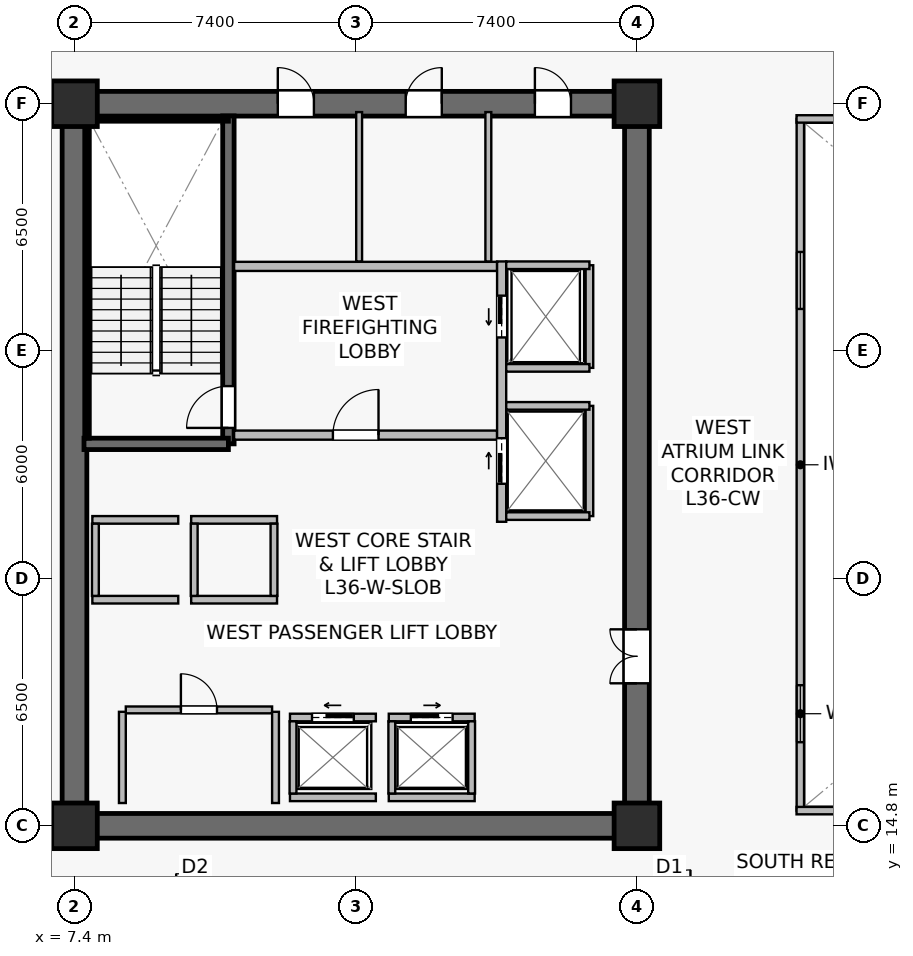
"""IFC4 building model, lengths in metres.
Left out: names, types, materials, properties, quantities, classifications, styles, units other than length and angle.
Written with IfcOpenShell. Run it as: python <this file> out.ifc"""

import sys

from ifc_helpers import new_model, si_unit, direction, frame, frame_2d, origin, origin_2d, place, context, subcontext, project, spatial, rectangle, extrude, source, transform, mapped, element, fill, save


model = new_model("IFC4")
c1 = context("Model", 3, precision=1e-05, world=origin(), true_north=direction((0.0, 1.0)))
c2 = subcontext(c1, "Body", "Model", "MODEL_VIEW")
j1 = project(units=[si_unit("LENGTHUNIT", "METRE"), si_unit("PLANEANGLEUNIT", "RADIAN")], contexts=[c1])
p1 = place(None, origin())
s1 = spatial("IfcSite", under=j1, at=p1, CompositionType="ELEMENT")
p2 = place(p1, origin())
s2 = spatial("IfcBuilding", under=s1, at=p2, CompositionType="ELEMENT")
p3 = place(p2, frame((0.0, 0.0, 150.2)))
s3 = spatial("IfcBuildingStorey", under=s2, at=p3, CompositionType="ELEMENT", Elevation=150.2)
p4 = place(p3, frame((7.075, 14.8, 0.0), z_axis=(0.0, 0.0, 1.0), x_axis=(1.0, 0.0, 0.0)))
e1 = element("IfcWall", 1, at=p4, inside=s3, PredefinedType="SHEAR", context=c2, shape_type="SweptSolid", body=[
    extrude(rectangle(XDim=15.45, YDim=0.65, at=frame_2d((7.725, 0.0))), origin(), (0.0, 0.0, 1.0), 3.79),
])
p5 = place(p3, frame((7.075, 33.8, 0.0), z_axis=(0.0, 0.0, 1.0), x_axis=(1.0, 0.0, 0.0)))
e2 = element("IfcWall", 2, at=p5, inside=s3, PredefinedType="SHEAR", context=c2, shape_type="SweptSolid", body=[
    extrude(rectangle(XDim=15.45, YDim=0.65, at=frame_2d((7.725, 0.0))), origin(), (0.0, 0.0, 1.0), 3.79),
])
p6 = place(p5, frame((5.675, 0.0, 0.0)))
e3 = element("IfcOpeningElement", 3, at=p6, cuts=e2, PredefinedType="OPENING", context=c2, shape_type="SweptSolid", body=[
    extrude(rectangle(XDim=0.95, YDim=2.15, at=frame_2d((0.475, 1.075))), frame((0.0, 0.335, 0.0), z_axis=(0.0, -1.0, 0.0), x_axis=(1.0, 0.0, 0.0)), (0.0, 0.0, 1.0), 0.67),
])
p7 = place(p5, frame((9.04, 0.0, 0.0)))
e4 = element("IfcOpeningElement", 4, at=p7, cuts=e2, PredefinedType="OPENING", context=c2, shape_type="SweptSolid", body=[
    extrude(rectangle(XDim=0.95, YDim=2.15, at=frame_2d((0.475, 1.075))), frame((0.0, 0.335, 0.0), z_axis=(0.0, -1.0, 0.0), x_axis=(1.0, 0.0, 0.0)), (0.0, 0.0, 1.0), 0.67),
])
p8 = place(p5, frame((12.44, 0.0, 0.0)))
e5 = element("IfcOpeningElement", 5, at=p8, cuts=e2, PredefinedType="OPENING", context=c2, shape_type="SweptSolid", body=[
    extrude(rectangle(XDim=0.95, YDim=2.15, at=frame_2d((0.475, 1.075))), frame((0.0, 0.335, 0.0), z_axis=(0.0, -1.0, 0.0), x_axis=(1.0, 0.0, 0.0)), (0.0, 0.0, 1.0), 0.67),
])
p9 = place(p3, frame((7.4, 15.125, 0.0), z_axis=(0.0, 0.0, 1.0), x_axis=(0.0, 1.0, 0.0)))
e6 = element("IfcWall", 6, at=p9, inside=s3, PredefinedType="SHEAR", context=c2, shape_type="SweptSolid", body=[
    extrude(rectangle(XDim=18.35, YDim=0.65, at=frame_2d((9.175, 0.0))), origin(), (0.0, 0.0, 1.0), 3.79),
])
p10 = place(p3, frame((22.2, 15.125, 0.0), z_axis=(0.0, 0.0, 1.0), x_axis=(0.0, 1.0, 0.0)))
e7 = element("IfcWall", 7, at=p10, inside=s3, PredefinedType="SHEAR", context=c2, shape_type="SweptSolid", body=[
    extrude(rectangle(XDim=18.35, YDim=0.65, at=frame_2d((9.175, 0.0))), origin(), (0.0, 0.0, 1.0), 3.79),
])
p11 = place(p10, frame((3.425, 0.0, 0.0)))
e8 = element("IfcOpeningElement", 8, at=p11, cuts=e7, PredefinedType="OPENING", context=c2, shape_type="SweptSolid", body=[
    extrude(rectangle(XDim=1.42, YDim=2.2, at=frame_2d((0.71, 1.1))), frame((0.0, 0.335, 0.0), z_axis=(0.0, -1.0, 0.0), x_axis=(1.0, 0.0, 0.0)), (0.0, 0.0, 1.0), 0.67),
])
p12 = place(p3, frame((11.45, 24.85, 0.0), z_axis=(0.0, 0.0, 1.0), x_axis=(0.0, 1.0, 0.0)))
e9 = element("IfcWall", 9, at=p12, inside=s3, PredefinedType="SHEAR", context=c2, shape_type="SweptSolid", body=[
    extrude(rectangle(XDim=8.63, YDim=0.3, at=frame_2d((4.315, 0.0))), origin(), (0.0, 0.0, 1.0), 3.79),
])
p13 = place(p12, frame((0.42, 0.0, 0.0)))
e10 = element("IfcOpeningElement", 10, at=p13, cuts=e9, PredefinedType="OPENING", context=c2, shape_type="SweptSolid", body=[
    extrude(rectangle(XDim=1.1, YDim=2.15, at=frame_2d((0.55, 1.075))), frame((0.0, 0.16, 0.0), z_axis=(0.0, -1.0, 0.0), x_axis=(1.0, 0.0, 0.0)), (0.0, 0.0, 1.0), 0.32),
])
p14 = place(p3, frame((7.65, 24.85, 0.0), z_axis=(0.0, 0.0, 1.0), x_axis=(1.0, 0.0, 0.0)))
e11 = element("IfcWall", 11, at=p14, inside=s3, PredefinedType="SHEAR", context=c2, shape_type="SweptSolid", body=[
    extrude(rectangle(XDim=3.8, YDim=0.3, at=frame_2d((1.9, 0.0))), origin(), (0.0, 0.0, 1.0), 3.79),
])
p15 = place(p3, frame((7.73, 33.4, 0.0), z_axis=(0.0, 0.0, 1.0), x_axis=(1.0, 0.0, 0.0)))
e12 = element("IfcWall", 12, at=p15, inside=s3, PredefinedType="SOLIDWALL", context=c2, shape_type="SweptSolid", body=[
    extrude(rectangle(XDim=3.72, YDim=0.12, at=frame_2d((1.86, 0.0))), origin(), (0.0, 0.0, 1.0), 3.79),
])
p16 = place(p3, frame((7.73, 25.0, 0.0), z_axis=(0.0, 0.0, 1.0), x_axis=(0.0, 1.0, 0.0)))
e13 = element("IfcWall", 13, at=p16, inside=s3, PredefinedType="SOLIDWALL", context=c2, shape_type="SweptSolid", body=[
    extrude(rectangle(XDim=8.32, YDim=0.12, at=frame_2d((4.16, 0.0))), origin(), (0.0, 0.0, 1.0), 3.79),
])
m1 = source(origin(), c2, "Body", "SweptSolid", [
    extrude(rectangle(XDim=1.2, YDim=1.2, at=origin_2d()), origin(), (0.0, 0.0, 1.0), 4.1),
])
for number, where, z_axis, x_axis in (
    (14, (7.4, 14.8, 0.0), (0.0, 0.0, 1.0), (1.0, 0.0, 0.0)),
    (15, (22.2, 14.8, 0.0), (0.0, 0.0, 1.0), (1.0, 0.0, 0.0)),
    (16, (7.4, 33.8, 0.0), (0.0, 0.0, 1.0), (1.0, 0.0, 0.0)),
    (17, (22.2, 33.8, 0.0), (0.0, 0.0, 1.0), (1.0, 0.0, 0.0)),
):
    element("IfcColumn", number, at=place(p3, frame(where, z_axis=z_axis, x_axis=x_axis)), inside=s3, PredefinedType="COLUMN", context=c2, shape_type="MappedRepresentation", body=[
        mapped(m1, transform((0.0, 0.0, 0.0), scale=1.0)),
    ])
p17 = place(p3, frame((11.6, 25.08, 0.0), z_axis=(0.0, 0.0, 1.0), x_axis=(1.0, 0.0, 0.0)))
e18 = element("IfcWall", 18, at=p17, inside=s3, PredefinedType="SOLIDWALL", context=c2, shape_type="SweptSolid", body=[
    extrude(rectangle(XDim=6.92, YDim=0.24, at=frame_2d((3.46, 0.0))), origin(), (0.0, 0.0, 1.0), 3.187),
])
p18 = place(p17, frame((2.6, 0.0, 0.0)))
e19 = element("IfcOpeningElement", 19, at=p18, cuts=e18, PredefinedType="OPENING", context=c2, shape_type="SweptSolid", body=[
    extrude(rectangle(XDim=1.2, YDim=2.16, at=frame_2d((0.6, 1.08))), frame((0.0, 0.13, 0.0), z_axis=(0.0, -1.0, 0.0), x_axis=(1.0, 0.0, 0.0)), (0.0, 0.0, 1.0), 0.26),
])
p19 = place(p3, frame((11.6, 29.52, 0.0), z_axis=(0.0, 0.0, 1.0), x_axis=(1.0, 0.0, 0.0)))
e20 = element("IfcWall", 20, at=p19, inside=s3, PredefinedType="SOLIDWALL", context=c2, shape_type="SweptSolid", body=[
    extrude(rectangle(XDim=6.92, YDim=0.24, at=frame_2d((3.46, 0.0))), origin(), (0.0, 0.0, 1.0), 3.187),
])
p20 = place(p3, frame((18.64, 22.8, 0.0), z_axis=(0.0, 0.0, 1.0), x_axis=(0.0, 1.0, 0.0)))
e21 = element("IfcWall", 21, at=p20, inside=s3, PredefinedType="SOLIDWALL", context=c2, shape_type="SweptSolid", body=[
    extrude(rectangle(XDim=6.85, YDim=0.24, at=frame_2d((3.425, 0.0))), origin(), (0.0, 0.0, 1.0), 2.875),
])
p21 = place(p20, frame((4.85, 0.0, 0.0)))
e22 = element("IfcOpeningElement", 22, at=p21, cuts=e21, PredefinedType="OPENING", context=c2, shape_type="SweptSolid", body=[
    extrude(rectangle(XDim=1.1, YDim=2.22, at=frame_2d((0.55, 1.11))), frame((0.0, 0.13, 0.0), z_axis=(0.0, -1.0, 0.0), x_axis=(1.0, 0.0, 0.0)), (0.0, 0.0, 1.0), 0.26),
])
p22 = place(p20, frame((1.0, 0.0, 0.0)))
e23 = element("IfcOpeningElement", 23, at=p22, cuts=e21, PredefinedType="OPENING", context=c2, shape_type="SweptSolid", body=[
    extrude(rectangle(XDim=1.2, YDim=2.22, at=frame_2d((0.6, 1.11))), frame((0.0, 0.13, 0.0), z_axis=(0.0, -1.0, 0.0), x_axis=(1.0, 0.0, 0.0)), (0.0, 0.0, 1.0), 0.26),
])
p23 = place(p3, frame((13.07, 17.65, 0.0), z_axis=(0.0, 0.0, 1.0), x_axis=(1.0, 0.0, 0.0)))
e24 = element("IfcWall", 24, at=p23, inside=s3, PredefinedType="SOLIDWALL", context=c2, shape_type="SweptSolid", body=[
    extrude(rectangle(XDim=2.26, YDim=0.2, at=frame_2d((1.13, 0.0))), origin(), (0.0, 0.0, 1.0), 3.187),
])
p24 = place(p23, frame((0.58, 0.0, 0.0)))
e25 = element("IfcOpeningElement", 25, at=p24, cuts=e24, PredefinedType="OPENING", context=c2, shape_type="SweptSolid", body=[
    extrude(rectangle(XDim=1.1, YDim=2.22, at=frame_2d((0.55, 1.11))), frame((0.0, 0.11, 0.0), z_axis=(0.0, -1.0, 0.0), x_axis=(1.0, 0.0, 0.0)), (0.0, 0.0, 1.0), 0.22),
])
p25 = place(p3, frame((13.07, 15.55, 0.0), z_axis=(0.0, 0.0, 1.0), x_axis=(1.0, 0.0, 0.0)))
e26 = element("IfcWall", 26, at=p25, inside=s3, PredefinedType="SOLIDWALL", context=c2, shape_type="SweptSolid", body=[
    extrude(rectangle(XDim=2.26, YDim=0.2, at=frame_2d((1.13, 0.0))), origin(), (0.0, 0.0, 1.0), 3.187),
])
p26 = place(p3, frame((13.15, 15.65, 0.0), z_axis=(0.0, 0.0, 1.0), x_axis=(0.0, 1.0, 0.0)))
e27 = element("IfcWall", 27, at=p26, inside=s3, PredefinedType="SOLIDWALL", context=c2, shape_type="SweptSolid", body=[
    extrude(rectangle(XDim=1.9, YDim=0.18, at=frame_2d((0.95, 0.0))), origin(), (0.0, 0.0, 1.0), 3.79),
])
p27 = place(p3, frame((15.67, 17.65, 0.0), z_axis=(0.0, 0.0, 1.0), x_axis=(1.0, 0.0, 0.0)))
e28 = element("IfcWall", 28, at=p27, inside=s3, PredefinedType="SOLIDWALL", context=c2, shape_type="SweptSolid", body=[
    extrude(rectangle(XDim=2.26, YDim=0.2, at=frame_2d((1.13, 0.0))), origin(), (0.0, 0.0, 1.0), 3.79),
])
p28 = place(p27, frame((0.58, 0.0, 0.0)))
e29 = element("IfcOpeningElement", 29, at=p28, cuts=e28, PredefinedType="OPENING", context=c2, shape_type="SweptSolid", body=[
    extrude(rectangle(XDim=1.1, YDim=2.22, at=frame_2d((0.55, 1.11))), frame((0.0, 0.11, 0.0), z_axis=(0.0, -1.0, 0.0), x_axis=(1.0, 0.0, 0.0)), (0.0, 0.0, 1.0), 0.22),
])
p29 = place(p3, frame((15.67, 15.55, 0.0), z_axis=(0.0, 0.0, 1.0), x_axis=(1.0, 0.0, 0.0)))
e30 = element("IfcWall", 30, at=p29, inside=s3, PredefinedType="SOLIDWALL", context=c2, shape_type="SweptSolid", body=[
    extrude(rectangle(XDim=2.26, YDim=0.2, at=frame_2d((1.13, 0.0))), origin(), (0.0, 0.0, 1.0), 3.79),
])
for number, where, z_axis, x_axis in (
    (31, (15.75, 15.65, 0.0), (0.0, 0.0, 1.0), (0.0, 1.0, 0.0)),
    (32, (17.85, 15.65, 0.0), (0.0, 0.0, 1.0), (0.0, 1.0, 0.0)),
):
    element("IfcWall", number, at=place(p3, frame(where, z_axis=z_axis, x_axis=x_axis)), inside=s3, PredefinedType="SOLIDWALL", context=c2, shape_type="SweptSolid", body=[
        extrude(rectangle(XDim=1.9, YDim=0.18, at=frame_2d((0.95, 0.0))), origin(), (0.0, 0.0, 1.0), 3.79),
    ])
for number, where, z_axis, x_axis in (
    (33, (7.87, 20.75, 0.0), (0.0, 0.0, 1.0), (1.0, 0.0, 0.0)),
    (34, (7.87, 22.85, 0.0), (0.0, 0.0, 1.0), (1.0, 0.0, 0.0)),
):
    element("IfcWall", number, at=place(p3, frame(where, z_axis=z_axis, x_axis=x_axis)), inside=s3, PredefinedType="SOLIDWALL", context=c2, shape_type="SweptSolid", body=[
        extrude(rectangle(XDim=2.26, YDim=0.2, at=frame_2d((1.13, 0.0))), origin(), (0.0, 0.0, 1.0), 3.79),
    ])
p30 = place(p3, frame((7.95, 20.85, 0.0), z_axis=(0.0, 0.0, 1.0), x_axis=(0.0, 1.0, 0.0)))
e35 = element("IfcWall", 35, at=p30, inside=s3, PredefinedType="SOLIDWALL", context=c2, shape_type="SweptSolid", body=[
    extrude(rectangle(XDim=1.9, YDim=0.18, at=frame_2d((0.95, 0.0))), origin(), (0.0, 0.0, 1.0), 3.79),
])
for number, where, z_axis, x_axis in (
    (36, (10.47, 20.75, 0.0), (0.0, 0.0, 1.0), (1.0, 0.0, 0.0)),
    (37, (10.47, 22.85, 0.0), (0.0, 0.0, 1.0), (1.0, 0.0, 0.0)),
):
    element("IfcWall", number, at=place(p3, frame(where, z_axis=z_axis, x_axis=x_axis)), inside=s3, PredefinedType="SOLIDWALL", context=c2, shape_type="SweptSolid", body=[
        extrude(rectangle(XDim=2.26, YDim=0.2, at=frame_2d((1.13, 0.0))), origin(), (0.0, 0.0, 1.0), 3.79),
    ])
for number, where, z_axis, x_axis in (
    (38, (10.55, 20.85, 0.0), (0.0, 0.0, 1.0), (0.0, 1.0, 0.0)),
    (39, (12.65, 20.85, 0.0), (0.0, 0.0, 1.0), (0.0, 1.0, 0.0)),
):
    element("IfcWall", number, at=place(p3, frame(where, z_axis=z_axis, x_axis=x_axis)), inside=s3, PredefinedType="SOLIDWALL", context=c2, shape_type="SweptSolid", body=[
        extrude(rectangle(XDim=1.9, YDim=0.18, at=frame_2d((0.95, 0.0))), origin(), (0.0, 0.0, 1.0), 3.79),
    ])
p31 = place(p3, frame((20.95, 26.85, 0.0), z_axis=(0.0, 0.0, 1.0), x_axis=(0.0, 1.0, 0.0)))
e40 = element("IfcWall", 40, at=p31, inside=s3, PredefinedType="SOLIDWALL", context=c2, shape_type="SweptSolid", body=[
    extrude(rectangle(XDim=2.7, YDim=0.2, at=frame_2d((1.35, 0.0))), origin(), (0.0, 0.0, 1.0), 3.79),
])
p32 = place(p3, frame((18.76, 29.55, 0.0), z_axis=(0.0, 0.0, 1.0), x_axis=(1.0, 0.0, 0.0)))
e41 = element("IfcWall", 41, at=p32, inside=s3, PredefinedType="SOLIDWALL", context=c2, shape_type="SweptSolid", body=[
    extrude(rectangle(XDim=2.19, YDim=0.2, at=frame_2d((1.095, 0.0))), origin(), (0.0, 0.0, 1.0), 3.79),
])
p33 = place(p3, frame((18.76, 26.85, 0.0), z_axis=(0.0, 0.0, 1.0), x_axis=(1.0, 0.0, 0.0)))
e42 = element("IfcWall", 42, at=p33, inside=s3, PredefinedType="SOLIDWALL", context=c2, shape_type="SweptSolid", body=[
    extrude(rectangle(XDim=2.19, YDim=0.2, at=frame_2d((1.095, 0.0))), origin(), (0.0, 0.0, 1.0), 3.187),
])
p34 = place(p3, frame((20.95, 22.95, 0.0), z_axis=(0.0, 0.0, 1.0), x_axis=(0.0, 1.0, 0.0)))
e43 = element("IfcWall", 43, at=p34, inside=s3, PredefinedType="SOLIDWALL", context=c2, shape_type="SweptSolid", body=[
    extrude(rectangle(XDim=2.9, YDim=0.2, at=frame_2d((1.45, 0.0))), origin(), (0.0, 0.0, 1.0), 2.875),
])
for number, where, z_axis, x_axis in (
    (44, (18.76, 25.85, 0.0), (0.0, 0.0, 1.0), (1.0, 0.0, 0.0)),
    (45, (18.76, 22.95, 0.0), (0.0, 0.0, 1.0), (1.0, 0.0, 0.0)),
):
    element("IfcWall", number, at=place(p3, frame(where, z_axis=z_axis, x_axis=x_axis)), inside=s3, PredefinedType="SOLIDWALL", context=c2, shape_type="SweptSolid", body=[
        extrude(rectangle(XDim=2.19, YDim=0.2, at=frame_2d((1.095, 0.0))), origin(), (0.0, 0.0, 1.0), 3.79),
    ])
p35 = place(p3, frame((8.75, 17.85, 0.0), z_axis=(0.0, 0.0, 1.0), x_axis=(1.0, 0.0, 0.0)))
e46 = element("IfcWall", 46, at=p35, inside=s3, PredefinedType="SOLIDWALL", context=c2, shape_type="SweptSolid", body=[
    extrude(rectangle(XDim=3.85, YDim=0.18, at=frame_2d((1.925, 0.0))), origin(), (0.0, 0.0, 1.0), 3.79),
])
p36 = place(p35, frame((1.45, 0.0, 0.0)))
e47 = element("IfcOpeningElement", 47, at=p36, cuts=e46, PredefinedType="OPENING", context=c2, shape_type="SweptSolid", body=[
    extrude(rectangle(XDim=0.95, YDim=2.15, at=frame_2d((0.475, 1.075))), frame((0.0, 0.1, 0.0), z_axis=(0.0, -1.0, 0.0), x_axis=(1.0, 0.0, 0.0)), (0.0, 0.0, 1.0), 0.2),
])
for number, where, z_axis, x_axis in (
    (48, (12.69, 15.4, 0.0), (0.0, 0.0, 1.0), (0.0, 1.0, 0.0)),
    (49, (8.66, 15.4, 0.0), (0.0, 0.0, 1.0), (0.0, 1.0, 0.0)),
):
    element("IfcWall", number, at=place(p3, frame(where, z_axis=z_axis, x_axis=x_axis)), inside=s3, PredefinedType="SOLIDWALL", context=c2, shape_type="SweptSolid", body=[
        extrude(rectangle(XDim=2.4, YDim=0.18, at=frame_2d((1.2, 0.0))), origin(), (0.0, 0.0, 1.0), 3.79),
    ])
p37 = place(p3, frame((14.89, 29.65, 0.0), z_axis=(0.0, 0.0, 1.0), x_axis=(0.0, 1.0, 0.0)))
e50 = element("IfcWall", 50, at=p37, inside=s3, PredefinedType="PLUMBINGWALL", context=c2, shape_type="SweptSolid", body=[
    extrude(rectangle(XDim=3.93, YDim=0.155, at=frame_2d((1.965, 0.0))), origin(), (0.0, 0.0, 1.0), 3.187),
])
p38 = place(p3, frame((18.29, 29.65, 0.0), z_axis=(0.0, 0.0, 1.0), x_axis=(0.0, 1.0, 0.0)))
e51 = element("IfcWall", 51, at=p38, inside=s3, PredefinedType="PLUMBINGWALL", context=c2, shape_type="SweptSolid", body=[
    extrude(rectangle(XDim=3.93, YDim=0.155, at=frame_2d((1.965, 0.0))), origin(), (0.0, 0.0, 1.0), 3.79),
])
p39 = place(p3, frame((26.5, 15.2, 0.0), z_axis=(0.0, 0.0, 1.0), x_axis=(0.0, 1.0, 0.0)))
e52 = element("IfcWall", 52, at=p39, inside=s3, PredefinedType="SOLIDWALL", context=c2, shape_type="SweptSolid", body=[
    extrude(rectangle(XDim=18.2, YDim=0.195, at=frame_2d((9.1, 0.0))), origin(), (0.0, 0.0, 1.0), 3.79),
])
p40 = place(p39, frame((1.8, 0.0, 0.9)))
e53 = element("IfcOpeningElement", 53, at=p40, cuts=e52, PredefinedType="OPENING", context=c2, shape_type="SweptSolid", body=[
    extrude(rectangle(XDim=1.5, YDim=1.4, at=frame_2d((0.75, 0.7))), frame((0.0, 0.107, 0.0), z_axis=(0.0, -1.0, 0.0), x_axis=(1.0, 0.0, 0.0)), (0.0, 0.0, 1.0), 0.215),
])
p41 = place(p39, frame((13.2, 0.0, 0.9)))
e54 = element("IfcOpeningElement", 54, at=p41, cuts=e52, PredefinedType="OPENING", context=c2, shape_type="SweptSolid", body=[
    extrude(rectangle(XDim=1.5, YDim=1.4, at=frame_2d((0.75, 0.7))), frame((0.0, 0.107, 0.0), z_axis=(0.0, -1.0, 0.0), x_axis=(1.0, 0.0, 0.0)), (0.0, 0.0, 1.0), 0.215),
])
for number, where, z_axis, x_axis in (
    (55, (26.4, 15.2, 0.0), (0.0, 0.0, 1.0), (1.0, 0.0, 0.0)),
    (56, (26.4, 33.4, 0.0), (0.0, 0.0, 1.0), (1.0, 0.0, 0.0)),
):
    element("IfcWall", number, at=place(p3, frame(where, z_axis=z_axis, x_axis=x_axis)), inside=s3, PredefinedType="SOLIDWALL", context=c2, shape_type="SweptSolid", body=[
        extrude(rectangle(XDim=22.0, YDim=0.195, at=frame_2d((11.0, 0.0))), origin(), (0.0, 0.0, 1.0), 3.79),
    ])
m2 = source(origin(), c2, "Body", "SweptSolid", [
    extrude(rectangle(XDim=1.5, YDim=1.4, at=frame_2d((0.75, 0.7))), frame((0.0, 0.03, 0.0), z_axis=(0.0, -1.0, 0.0), x_axis=(1.0, 0.0, 0.0)), (0.0, 0.0, 1.0), 0.06),
])
p42 = place(p40, origin())
e57 = element("IfcWindow", 57, at=p42, inside=s3, PartitioningType="SINGLE_PANEL", PredefinedType="WINDOW", context=c2, shape_type="MappedRepresentation", body=[
    mapped(m2, transform((0.0, 0.0, 0.0), scale=1.0)),
])
fill(e53, e57)
p43 = place(p41, origin())
e58 = element("IfcWindow", 58, at=p43, inside=s3, PartitioningType="SINGLE_PANEL", PredefinedType="WINDOW", context=c2, shape_type="MappedRepresentation", body=[
    mapped(m2, transform((0.0, 0.0, 0.0), scale=1.0)),
])
fill(e54, e58)
m3 = source(origin(), c2, "Body", "SweptSolid", [
    extrude(rectangle(XDim=1.1, YDim=2.15, at=frame_2d((0.55, 1.075))), frame((0.0, 0.025, 0.0), z_axis=(0.0, -1.0, 0.0), x_axis=(1.0, 0.0, 0.0)), (0.0, 0.0, 1.0), 0.05),
])
p44 = place(p13, origin())
e59 = element("IfcDoor", 59, at=p44, inside=s3, OperationType="SINGLE_SWING_LEFT", PredefinedType="DOOR", context=c2, shape_type="MappedRepresentation", body=[
    mapped(m3, transform((0.0, 0.0, 0.0), scale=1.0)),
])
fill(e10, e59)
m4 = source(origin(), c2, "Body", "SweptSolid", [
    extrude(rectangle(XDim=1.2, YDim=2.16, at=frame_2d((0.6, 1.08))), frame((0.0, 0.025, 0.0), z_axis=(0.0, -1.0, 0.0), x_axis=(1.0, 0.0, 0.0)), (0.0, 0.0, 1.0), 0.05),
])
p45 = place(p18, origin())
e60 = element("IfcDoor", 60, at=p45, inside=s3, OperationType="SINGLE_SWING_RIGHT", PredefinedType="DOOR", context=c2, shape_type="MappedRepresentation", body=[
    mapped(m4, transform((0.0, 0.0, 0.0), scale=1.0)),
])
fill(e19, e60)
m5 = source(origin(), c2, "Body", "SweptSolid", [
    extrude(rectangle(XDim=1.1, YDim=2.22, at=frame_2d((0.55, 1.11))), frame((0.0, 0.025, 0.0), z_axis=(0.0, -1.0, 0.0), x_axis=(1.0, 0.0, 0.0)), (0.0, 0.0, 1.0), 0.05),
])
p46 = place(p24, origin())
e61 = element("IfcDoor", 61, at=p46, inside=s3, OperationType="SLIDING_TO_LEFT", PredefinedType="USERDEFINED", context=c2, shape_type="MappedRepresentation", body=[
    mapped(m5, transform((0.0, 0.0, 0.0), scale=1.0)),
])
fill(e25, e61)
p47 = place(p28, origin())
e62 = element("IfcDoor", 62, at=p47, inside=s3, OperationType="SLIDING_TO_RIGHT", PredefinedType="USERDEFINED", context=c2, shape_type="MappedRepresentation", body=[
    mapped(m5, transform((0.0, 0.0, 0.0), scale=1.0)),
])
fill(e29, e62)
p48 = place(p21, origin())
e63 = element("IfcDoor", 63, at=p48, inside=s3, OperationType="SLIDING_TO_LEFT", PredefinedType="USERDEFINED", context=c2, shape_type="MappedRepresentation", body=[
    mapped(m5, transform((0.0, 0.0, 0.0), scale=1.0)),
])
fill(e22, e63)
m6 = source(origin(), c2, "Body", "SweptSolid", [
    extrude(rectangle(XDim=1.2, YDim=2.22, at=frame_2d((0.6, 1.11))), frame((0.0, 0.025, 0.0), z_axis=(0.0, -1.0, 0.0), x_axis=(1.0, 0.0, 0.0)), (0.0, 0.0, 1.0), 0.05),
])
p49 = place(p22, origin())
e64 = element("IfcDoor", 64, at=p49, inside=s3, OperationType="SLIDING_TO_RIGHT", PredefinedType="USERDEFINED", context=c2, shape_type="MappedRepresentation", body=[
    mapped(m6, transform((0.0, 0.0, 0.0), scale=1.0)),
])
fill(e23, e64)
m7 = source(origin(), c2, "Body", "SweptSolid", [
    extrude(rectangle(XDim=0.95, YDim=2.15, at=frame_2d((0.475, 1.075))), frame((0.0, 0.025, 0.0), z_axis=(0.0, -1.0, 0.0), x_axis=(1.0, 0.0, 0.0)), (0.0, 0.0, 1.0), 0.05),
])
p50 = place(p36, origin())
e65 = element("IfcDoor", 65, at=p50, inside=s3, OperationType="SINGLE_SWING_LEFT", PredefinedType="DOOR", context=c2, shape_type="MappedRepresentation", body=[
    mapped(m7, transform((0.0, 0.0, 0.0), scale=1.0)),
])
fill(e47, e65)
m8 = source(origin(), c2, "Body", "SweptSolid", [
    extrude(rectangle(XDim=1.42, YDim=2.2, at=frame_2d((0.71, 1.1))), frame((0.0, 0.025, 0.0), z_axis=(0.0, -1.0, 0.0), x_axis=(1.0, 0.0, 0.0)), (0.0, 0.0, 1.0), 0.05),
])
p51 = place(p11, origin())
e66 = element("IfcDoor", 66, at=p51, inside=s3, OperationType="DOUBLE_DOOR_SINGLE_SWING", PredefinedType="DOOR", context=c2, shape_type="MappedRepresentation", body=[
    mapped(m8, transform((0.0, 0.0, 0.0), scale=1.0)),
])
fill(e8, e66)
p52 = place(p6, origin())
e67 = element("IfcDoor", 67, at=p52, inside=s3, OperationType="SINGLE_SWING_LEFT", PredefinedType="DOOR", context=c2, shape_type="MappedRepresentation", body=[
    mapped(m7, transform((0.0, 0.0, 0.0), scale=1.0)),
])
fill(e3, e67)
p53 = place(p7, origin())
e68 = element("IfcDoor", 68, at=p53, inside=s3, OperationType="SINGLE_SWING_RIGHT", PredefinedType="DOOR", context=c2, shape_type="MappedRepresentation", body=[
    mapped(m7, transform((0.0, 0.0, 0.0), scale=1.0)),
])
fill(e4, e68)
p54 = place(p8, origin())
e69 = element("IfcDoor", 69, at=p54, inside=s3, OperationType="SINGLE_SWING_LEFT", PredefinedType="DOOR", context=c2, shape_type="MappedRepresentation", body=[
    mapped(m7, transform((0.0, 0.0, 0.0), scale=1.0)),
])
fill(e5, e69)
save(model, sys.argv[1])
